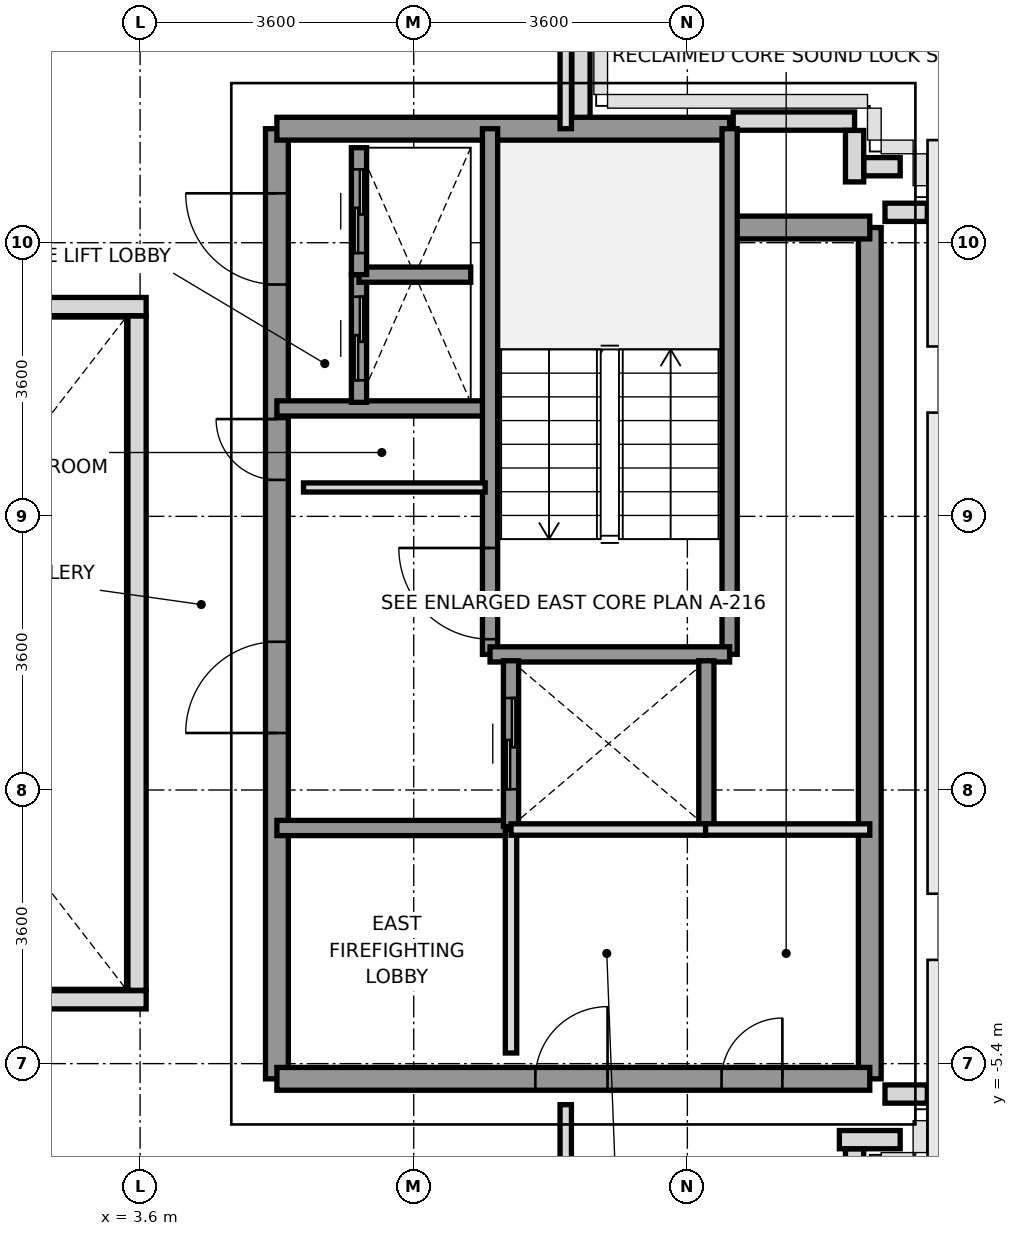
"""IFC4 building model, lengths in metres.
Left out: names, types, materials, properties, quantities, classifications, styles, units other than length and angle.
Written with IfcOpenShell. Run it as: python <this file> out.ifc"""

import sys

from ifc_helpers import new_model, si_unit, direction, frame, frame_2d, origin, place, context, subcontext, project, spatial, rectangle, extrude, source, transform, mapped, element, fill, save


model = new_model("IFC4")
c1 = context("Model", 3, precision=1e-05, world=origin(), true_north=direction((0.0, 1.0)))
c2 = subcontext(c1, "Body", "Model", "MODEL_VIEW")
j1 = project(units=[si_unit("LENGTHUNIT", "METRE"), si_unit("PLANEANGLEUNIT", "RADIAN")], contexts=[c1])
p1 = place(None, origin())
s1 = spatial("IfcSite", under=j1, at=p1, CompositionType="ELEMENT")
p2 = place(p1, origin())
s2 = spatial("IfcBuilding", under=s1, at=p2, CompositionType="ELEMENT")
p3 = place(p2, frame((0.0, 0.0, 262.0)))
s3 = spatial("IfcBuildingStorey", under=s2, at=p3, CompositionType="ELEMENT", Elevation=262.0)
p4 = place(p3, frame((13.957, -5.8, 0.0), z_axis=(0.0, 0.0, 1.0), x_axis=(-1.0, 0.0, 0.0)))
e1 = element("IfcWall", 1, at=p4, inside=s3, PredefinedType="PARAPET", context=c2, shape_type="SweptSolid", body=[
    extrude(rectangle(XDim=0.557, YDim=0.24, at=frame_2d((0.279, 0.0))), origin(), (0.0, 0.0, 1.0), 1.15),
])
p5 = place(p3, frame((13.6, -6.4, 0.0), z_axis=(0.0, 0.0, 1.0), x_axis=(-1.0, 0.0, 0.0)))
e2 = element("IfcWall", 2, at=p5, inside=s3, PredefinedType="PARAPET", context=c2, shape_type="SweptSolid", body=[
    extrude(rectangle(XDim=0.8, YDim=0.24, at=frame_2d((0.4, 0.0))), origin(), (0.0, 0.0, 1.0), 1.15),
])
p6 = place(p3, frame((13.0, -6.523, 0.0), z_axis=(0.0, 0.0, 1.0), x_axis=(0.0, -1.0, 0.0)))
e3 = element("IfcWall", 3, at=p6, inside=s3, PredefinedType="PARAPET", context=c2, shape_type="SweptSolid", body=[
    extrude(rectangle(XDim=0.477, YDim=0.24, at=frame_2d((0.239, 0.0))), origin(), (0.0, 0.0, 1.0), 1.15),
])
p7 = place(p3, frame((9.4, 8.622, 0.0), z_axis=(0.0, 0.0, 1.0), x_axis=(0.0, -1.0, 0.0)))
e4 = element("IfcWall", 4, at=p7, inside=s3, PredefinedType="PARAPET", context=c2, shape_type="SweptSolid", body=[
    extrude(rectangle(XDim=1.669, YDim=0.24, at=frame_2d((0.834, 0.0))), origin(), (0.0, 0.0, 1.0), 1.15),
])
p8 = place(p3, frame((11.403, 7.0, 0.0), z_axis=(0.0, 0.0, 1.0), x_axis=(1.0, 0.0, 0.0)))
e5 = element("IfcWall", 5, at=p8, inside=s3, PredefinedType="PARAPET", context=c2, shape_type="SweptSolid", body=[
    extrude(rectangle(XDim=1.597, YDim=0.24, at=frame_2d((0.798, 0.0))), origin(), (0.0, 0.0, 1.0), 1.15),
])
p9 = place(p3, frame((13.0, 6.877, 0.0), z_axis=(0.0, 0.0, 1.0), x_axis=(0.0, -1.0, 0.0)))
e6 = element("IfcWall", 6, at=p9, inside=s3, PredefinedType="PARAPET", context=c2, shape_type="SweptSolid", body=[
    extrude(rectangle(XDim=0.677, YDim=0.24, at=frame_2d((0.338, 0.0))), origin(), (0.0, 0.0, 1.0), 1.15),
])
p10 = place(p3, frame((13.123, 6.4, 0.0), z_axis=(0.0, 0.0, 1.0), x_axis=(1.0, 0.0, 0.0)))
e7 = element("IfcWall", 7, at=p10, inside=s3, PredefinedType="PARAPET", context=c2, shape_type="SweptSolid", body=[
    extrude(rectangle(XDim=0.477, YDim=0.24, at=frame_2d((0.239, 0.0))), origin(), (0.0, 0.0, 1.0), 1.15),
])
p11 = place(p3, frame((13.4, 5.8, 0.0), z_axis=(0.0, 0.0, 1.0), x_axis=(1.0, 0.0, 0.0)))
e8 = element("IfcWall", 8, at=p11, inside=s3, PredefinedType="PARAPET", context=c2, shape_type="SweptSolid", body=[
    extrude(rectangle(XDim=0.557, YDim=0.24, at=frame_2d((0.279, 0.0))), origin(), (0.0, 0.0, 1.0), 1.15),
])
p12 = place(p3, frame((13.2, -5.6, 0.0), z_axis=(0.0, 0.0, 1.0), x_axis=(0.0, 1.0, 0.0)))
e9 = element("IfcWall", 9, at=p12, inside=s3, PredefinedType="SHEAR", context=c2, shape_type="SweptSolid", body=[
    extrude(rectangle(XDim=11.2, YDim=0.3, at=frame_2d((5.6, 0.0))), origin(), (0.0, 0.0, 1.0), 3.01),
])
p13 = place(p3, frame((5.4, -5.6, 0.0), z_axis=(0.0, 0.0, 1.0), x_axis=(0.0, 1.0, 0.0)))
e10 = element("IfcWall", 10, at=p13, inside=s3, PredefinedType="SHEAR", context=c2, shape_type="SweptSolid", body=[
    extrude(rectangle(XDim=12.5, YDim=0.3, at=frame_2d((6.25, 0.0))), origin(), (0.0, 0.0, 1.0), 3.01),
])
p14 = place(p13, frame((4.55, 0.0, 0.0)))
e11 = element("IfcOpeningElement", 11, at=p14, cuts=e10, PredefinedType="OPENING", context=c2, shape_type="SweptSolid", body=[
    extrude(rectangle(XDim=1.2, YDim=2.2, at=frame_2d((0.6, 1.1))), frame((0.0, 0.16, 0.0), z_axis=(0.0, -1.0, 0.0), x_axis=(1.0, 0.0, 0.0)), (0.0, 0.0, 1.0), 0.32),
])
p15 = place(p13, frame((10.45, 0.0, 0.0)))
e12 = element("IfcOpeningElement", 12, at=p15, cuts=e10, PredefinedType="OPENING", context=c2, shape_type="SweptSolid", body=[
    extrude(rectangle(XDim=1.2, YDim=2.2, at=frame_2d((0.6, 1.1))), frame((0.0, 0.16, 0.0), z_axis=(0.0, -1.0, 0.0), x_axis=(1.0, 0.0, 0.0)), (0.0, 0.0, 1.0), 0.32),
])
p16 = place(p13, frame((7.88, 0.0, 0.0)))
e13 = element("IfcOpeningElement", 13, at=p16, cuts=e10, PredefinedType="OPENING", context=c2, shape_type="SweptSolid", body=[
    extrude(rectangle(XDim=0.8, YDim=2.1, at=frame_2d((0.4, 1.05))), frame((0.0, 0.16, 0.0), z_axis=(0.0, -1.0, 0.0), x_axis=(1.0, 0.0, 0.0)), (0.0, 0.0, 1.0), 0.32),
])
p17 = place(p3, frame((5.4, 6.9, 0.0), z_axis=(0.0, 0.0, 1.0), x_axis=(1.0, 0.0, 0.0)))
e14 = element("IfcWall", 14, at=p17, inside=s3, PredefinedType="SHEAR", context=c2, shape_type="SweptSolid", body=[
    extrude(rectangle(XDim=5.956, YDim=0.3, at=frame_2d((2.978, 0.0))), origin(), (0.0, 0.0, 1.0), 3.01),
])
p18 = place(p3, frame((11.356, 5.6, 0.0), z_axis=(0.0, 0.0, 1.0), x_axis=(1.0, 0.0, 0.0)))
e15 = element("IfcWall", 15, at=p18, inside=s3, PredefinedType="SHEAR", context=c2, shape_type="SweptSolid", body=[
    extrude(rectangle(XDim=1.844, YDim=0.3, at=frame_2d((0.922, 0.0))), origin(), (0.0, 0.0, 1.0), 3.01),
])
p19 = place(p3, frame((5.4, -5.6, 0.0), z_axis=(0.0, 0.0, 1.0), x_axis=(1.0, 0.0, 0.0)))
e16 = element("IfcWall", 16, at=p19, inside=s3, PredefinedType="SHEAR", context=c2, shape_type="SweptSolid", body=[
    extrude(rectangle(XDim=7.8, YDim=0.3, at=frame_2d((3.9, 0.0))), origin(), (0.0, 0.0, 1.0), 3.01),
])
p20 = place(p19, frame((5.85, 0.0, 0.0)))
e17 = element("IfcOpeningElement", 17, at=p20, cuts=e16, PredefinedType="OPENING", context=c2, shape_type="SweptSolid", body=[
    extrude(rectangle(XDim=0.8, YDim=2.1, at=frame_2d((0.4, 1.05))), frame((0.0, 0.16, 0.0), z_axis=(0.0, -1.0, 0.0), x_axis=(1.0, 0.0, 0.0)), (0.0, 0.0, 1.0), 0.32),
])
p21 = place(p19, frame((3.4, 0.0, 0.0)))
e18 = element("IfcOpeningElement", 18, at=p21, cuts=e16, PredefinedType="OPENING", context=c2, shape_type="SweptSolid", body=[
    extrude(rectangle(XDim=0.95, YDim=2.15, at=frame_2d((0.475, 1.075))), frame((0.0, 0.16, 0.0), z_axis=(0.0, -1.0, 0.0), x_axis=(1.0, 0.0, 0.0)), (0.0, 0.0, 1.0), 0.32),
])
p22 = place(p3, frame((5.4, 3.22, 0.0), z_axis=(0.0, 0.0, 1.0), x_axis=(1.0, 0.0, 0.0)))
e19 = element("IfcWall", 19, at=p22, inside=s3, PredefinedType="SOLIDWALL", context=c2, shape_type="SweptSolid", body=[
    extrude(rectangle(XDim=2.78, YDim=0.2, at=frame_2d((1.39, 0.0))), origin(), (0.0, 0.0, 1.0), 3.01),
])
p23 = place(p3, frame((5.4, -2.3, 0.0), z_axis=(0.0, 0.0, 1.0), x_axis=(1.0, 0.0, 0.0)))
e20 = element("IfcWall", 20, at=p23, inside=s3, PredefinedType="SOLIDWALL", context=c2, shape_type="SweptSolid", body=[
    extrude(rectangle(XDim=3.08, YDim=0.2, at=frame_2d((1.54, 0.0))), origin(), (0.0, 0.0, 1.0), 3.01),
])
p24 = place(p3, frame((8.204, -0.016, 0.0), z_axis=(0.0, 0.0, 1.0), x_axis=(0.0, 1.0, 0.0)))
e21 = element("IfcWall", 21, at=p24, inside=s3, PredefinedType="SOLIDWALL", context=c2, shape_type="SweptSolid", body=[
    extrude(rectangle(XDim=6.916, YDim=0.2, at=frame_2d((3.458, 0.0))), origin(), (0.0, 0.0, 1.0), 3.01),
])
p25 = place(p24, frame((0.2, 0.0, 0.0)))
e22 = element("IfcOpeningElement", 22, at=p25, cuts=e21, PredefinedType="OPENING", context=c2, shape_type="SweptSolid", body=[
    extrude(rectangle(XDim=1.2, YDim=2.2, at=frame_2d((0.6, 1.1))), frame((0.0, 0.11, 0.0), z_axis=(0.0, -1.0, 0.0), x_axis=(1.0, 0.0, 0.0)), (0.0, 0.0, 1.0), 0.22),
])
p26 = place(p3, frame((11.356, -0.016, 0.0), z_axis=(0.0, 0.0, 1.0), x_axis=(0.0, 1.0, 0.0)))
e23 = element("IfcWall", 23, at=p26, inside=s3, PredefinedType="SOLIDWALL", context=c2, shape_type="SweptSolid", body=[
    extrude(rectangle(XDim=6.916, YDim=0.2, at=frame_2d((3.458, 0.0))), origin(), (0.0, 0.0, 1.0), 3.01),
])
p27 = place(p3, frame((8.204, -0.016, 0.0), z_axis=(0.0, 0.0, 1.0), x_axis=(1.0, 0.0, 0.0)))
e24 = element("IfcWall", 24, at=p27, inside=s3, PredefinedType="SOLIDWALL", context=c2, shape_type="SweptSolid", body=[
    extrude(rectangle(XDim=3.152, YDim=0.2, at=frame_2d((1.576, 0.0))), origin(), (0.0, 0.0, 1.0), 3.01),
])
p28 = place(p3, frame((8.48, -2.28, 0.0), z_axis=(0.0, 0.0, 1.0), x_axis=(0.0, 1.0, 0.0)))
e25 = element("IfcWall", 25, at=p28, inside=s3, PredefinedType="SOLIDWALL", context=c2, shape_type="SweptSolid", body=[
    extrude(rectangle(XDim=2.18, YDim=0.2, at=frame_2d((1.09, 0.0))), origin(), (0.0, 0.0, 1.0), 3.01),
])
p29 = place(p28, frame((0.49, 0.0, 0.0)))
e26 = element("IfcOpeningElement", 26, at=p29, cuts=e25, PredefinedType="OPENING", context=c2, shape_type="SweptSolid", body=[
    extrude(rectangle(XDim=1.2, YDim=2.2, at=frame_2d((0.6, 1.1))), frame((0.0, 0.11, 0.0), z_axis=(0.0, -1.0, 0.0), x_axis=(1.0, 0.0, 0.0)), (0.0, 0.0, 1.0), 0.22),
])
p30 = place(p3, frame((11.05, -2.28, 0.0), z_axis=(0.0, 0.0, 1.0), x_axis=(0.0, 1.0, 0.0)))
e27 = element("IfcWall", 27, at=p30, inside=s3, PredefinedType="SOLIDWALL", context=c2, shape_type="SweptSolid", body=[
    extrude(rectangle(XDim=2.18, YDim=0.2, at=frame_2d((1.09, 0.0))), origin(), (0.0, 0.0, 1.0), 3.01),
])
p31 = place(p3, frame((6.48, 3.3, 0.0), z_axis=(0.0, 0.0, 1.0), x_axis=(0.0, 1.0, 0.0)))
e28 = element("IfcWall", 28, at=p31, inside=s3, PredefinedType="SOLIDWALL", context=c2, shape_type="SweptSolid", body=[
    extrude(rectangle(XDim=1.68, YDim=0.2, at=frame_2d((0.84, 0.0))), origin(), (0.0, 0.0, 1.0), 3.01),
])
p32 = place(p31, frame((0.29, 0.0, 0.0)))
e29 = element("IfcOpeningElement", 29, at=p32, cuts=e28, PredefinedType="OPENING", context=c2, shape_type="SweptSolid", body=[
    extrude(rectangle(XDim=1.1, YDim=2.2, at=frame_2d((0.55, 1.1))), frame((0.0, 0.11, 0.0), z_axis=(0.0, -1.0, 0.0), x_axis=(1.0, 0.0, 0.0)), (0.0, 0.0, 1.0), 0.22),
])
p33 = place(p3, frame((6.48, 4.98, 0.0), z_axis=(0.0, 0.0, 1.0), x_axis=(1.0, 0.0, 0.0)))
e30 = element("IfcWall", 30, at=p33, inside=s3, PredefinedType="SOLIDWALL", context=c2, shape_type="SweptSolid", body=[
    extrude(rectangle(XDim=1.47, YDim=0.2, at=frame_2d((0.735, 0.0))), origin(), (0.0, 0.0, 1.0), 3.01),
])
p34 = place(p3, frame((6.48, 4.98, 0.0), z_axis=(0.0, 0.0, 1.0), x_axis=(0.0, 1.0, 0.0)))
e31 = element("IfcWall", 31, at=p34, inside=s3, PredefinedType="SOLIDWALL", context=c2, shape_type="SweptSolid", body=[
    extrude(rectangle(XDim=1.67, YDim=0.2, at=frame_2d((0.835, 0.0))), origin(), (0.0, 0.0, 1.0), 3.01),
])
p35 = place(p34, frame((0.285, 0.0, 0.0)))
e32 = element("IfcOpeningElement", 32, at=p35, cuts=e31, PredefinedType="OPENING", context=c2, shape_type="SweptSolid", body=[
    extrude(rectangle(XDim=1.1, YDim=2.2, at=frame_2d((0.55, 1.1))), frame((0.0, 0.11, 0.0), z_axis=(0.0, -1.0, 0.0), x_axis=(1.0, 0.0, 0.0)), (0.0, 0.0, 1.0), 0.22),
])
p36 = place(p3, frame((5.75, 2.18, 0.0), z_axis=(0.0, 0.0, 1.0), x_axis=(1.0, 0.0, 0.0)))
e33 = element("IfcWall", 33, at=p36, inside=s3, PredefinedType="PARTITIONING", context=c2, shape_type="SweptSolid", body=[
    extrude(rectangle(XDim=2.39, YDim=0.12, at=frame_2d((1.195, 0.0))), origin(), (0.0, 0.0, 1.0), 3.01),
])
p37 = place(p3, frame((11.02, -2.32, 0.0), z_axis=(0.0, 0.0, 1.0), x_axis=(1.0, 0.0, 0.0)))
e34 = element("IfcWall", 34, at=p37, inside=s3, PredefinedType="PARTITIONING", context=c2, shape_type="SweptSolid", body=[
    extrude(rectangle(XDim=2.18, YDim=0.15, at=frame_2d((1.09, 0.0))), origin(), (0.0, 0.0, 1.0), 3.01),
])
p38 = place(p3, frame((8.48, -5.26, 0.0), z_axis=(0.0, 0.0, 1.0), x_axis=(0.0, 1.0, 0.0)))
e35 = element("IfcWall", 35, at=p38, inside=s3, PredefinedType="PARTITIONING", context=c2, shape_type="SweptSolid", body=[
    extrude(rectangle(XDim=2.94, YDim=0.15, at=frame_2d((1.47, 0.0))), origin(), (0.0, 0.0, 1.0), 3.01),
])
p39 = place(p3, frame((8.48, -2.32, 0.0), z_axis=(0.0, 0.0, 1.0), x_axis=(1.0, 0.0, 0.0)))
e36 = element("IfcWall", 36, at=p39, inside=s3, PredefinedType="PARTITIONING", context=c2, shape_type="SweptSolid", body=[
    extrude(rectangle(XDim=2.56, YDim=0.15, at=frame_2d((1.28, 0.0))), origin(), (0.0, 0.0, 1.0), 3.01),
])
p40 = place(p3, frame((9.2, 6.9, 0.0), z_axis=(0.0, 0.0, 1.0), x_axis=(0.0, 1.0, 0.0)))
e37 = element("IfcWall", 37, at=p40, inside=s3, PredefinedType="PARTITIONING", context=c2, shape_type="SweptSolid", body=[
    extrude(rectangle(XDim=3.38, YDim=0.15, at=frame_2d((1.69, 0.0))), origin(), (0.0, 0.0, 1.0), 2.61),
])
p41 = place(p3, frame((9.2, -10.28, 0.0), z_axis=(0.0, 0.0, 1.0), x_axis=(0.0, 1.0, 0.0)))
e38 = element("IfcWall", 38, at=p41, inside=s3, PredefinedType="PARTITIONING", context=c2, shape_type="SweptSolid", body=[
    extrude(rectangle(XDim=4.34, YDim=0.15, at=frame_2d((2.17, 0.0))), origin(), (0.0, 0.0, 1.0), 2.61),
])
for number, where, z_axis, x_axis in (
    (39, (-3.68, -4.56, 0.0), (0.0, 0.0, 1.0), (1.0, 0.0, 0.0)),
    (40, (-3.68, 4.56, 0.0), (0.0, 0.0, 1.0), (1.0, 0.0, 0.0)),
):
    element("IfcWall", number, at=place(p3, frame(where, z_axis=z_axis, x_axis=x_axis)), inside=s3, PredefinedType="PARAPET", context=c2, shape_type="SweptSolid", body=[
        extrude(rectangle(XDim=7.36, YDim=0.24, at=frame_2d((3.68, 0.0))), origin(), (0.0, 0.0, 1.0), 1.15),
    ])
p42 = place(p3, frame((3.56, -4.435, 0.0), z_axis=(0.0, 0.0, 1.0), x_axis=(0.0, 1.0, 0.0)))
e41 = element("IfcWall", 41, at=p42, inside=s3, PredefinedType="PARAPET", context=c2, shape_type="SweptSolid", body=[
    extrude(rectangle(XDim=8.87, YDim=0.24, at=frame_2d((4.435, 0.0))), origin(), (0.0, 0.0, 1.0), 1.15),
])
m1 = source(origin(), c2, "Body", "SweptSolid", [
    extrude(rectangle(XDim=1.2, YDim=2.2, at=frame_2d((0.6, 1.1))), frame((0.0, 0.025, 0.0), z_axis=(0.0, -1.0, 0.0), x_axis=(1.0, 0.0, 0.0)), (0.0, 0.0, 1.0), 0.05),
])
p43 = place(p25, origin())
e42 = element("IfcDoor", 42, at=p43, inside=s3, OperationType="SINGLE_SWING_RIGHT", PredefinedType="DOOR", context=c2, shape_type="MappedRepresentation", body=[
    mapped(m1, transform((0.0, 0.0, 0.0), x_axis=(1.0, 0.0, 0.0), y_axis=(0.0, 1.0, 0.0), z_axis=(0.0, 0.0, 1.0), scale=1.0)),
])
fill(e22, e42)
p44 = place(p14, origin())
e43 = element("IfcDoor", 43, at=p44, inside=s3, OperationType="SINGLE_SWING_LEFT", PredefinedType="DOOR", context=c2, shape_type="MappedRepresentation", body=[
    mapped(m1, transform((0.0, 0.0, 0.0), x_axis=(1.0, 0.0, 0.0), y_axis=(0.0, 1.0, 0.0), z_axis=(0.0, 0.0, 1.0), scale=1.0)),
])
fill(e11, e43)
p45 = place(p15, origin())
e44 = element("IfcDoor", 44, at=p45, inside=s3, OperationType="SINGLE_SWING_RIGHT", PredefinedType="DOOR", context=c2, shape_type="MappedRepresentation", body=[
    mapped(m1, transform((0.0, 0.0, 0.0), x_axis=(1.0, 0.0, 0.0), y_axis=(0.0, 1.0, 0.0), z_axis=(0.0, 0.0, 1.0), scale=1.0)),
])
fill(e12, e44)
m2 = source(origin(), c2, "Body", "SweptSolid", [
    extrude(rectangle(XDim=0.8, YDim=2.1, at=frame_2d((0.4, 1.05))), frame((0.0, 0.025, 0.0), z_axis=(0.0, -1.0, 0.0), x_axis=(1.0, 0.0, 0.0)), (0.0, 0.0, 1.0), 0.05),
])
p46 = place(p16, origin())
e45 = element("IfcDoor", 45, at=p46, inside=s3, OperationType="SINGLE_SWING_RIGHT", PredefinedType="DOOR", context=c2, shape_type="MappedRepresentation", body=[
    mapped(m2, transform((0.0, 0.0, 0.0), x_axis=(1.0, 0.0, 0.0), y_axis=(0.0, 1.0, 0.0), z_axis=(0.0, 0.0, 1.0), scale=1.0)),
])
fill(e13, e45)
p47 = place(p20, origin())
e46 = element("IfcDoor", 46, at=p47, inside=s3, OperationType="SINGLE_SWING_RIGHT", PredefinedType="DOOR", context=c2, shape_type="MappedRepresentation", body=[
    mapped(m2, transform((0.0, 0.0, 0.0), x_axis=(1.0, 0.0, 0.0), y_axis=(0.0, 1.0, 0.0), z_axis=(0.0, 0.0, 1.0), scale=1.0)),
])
fill(e17, e46)
m3 = source(origin(), c2, "Body", "SweptSolid", [
    extrude(rectangle(XDim=0.95, YDim=2.15, at=frame_2d((0.475, 1.075))), frame((0.0, 0.025, 0.0), z_axis=(0.0, -1.0, 0.0), x_axis=(1.0, 0.0, 0.0)), (0.0, 0.0, 1.0), 0.05),
])
p48 = place(p21, origin())
e47 = element("IfcDoor", 47, at=p48, inside=s3, OperationType="SINGLE_SWING_RIGHT", PredefinedType="DOOR", context=c2, shape_type="MappedRepresentation", body=[
    mapped(m3, transform((0.0, 0.0, 0.0), x_axis=(1.0, 0.0, 0.0), y_axis=(0.0, 1.0, 0.0), z_axis=(0.0, 0.0, 1.0), scale=1.0)),
])
fill(e18, e47)
p49 = place(p29, origin())
e48 = element("IfcDoor", 48, at=p49, inside=s3, OperationType="SLIDING_TO_RIGHT", PredefinedType="DOOR", context=c2, shape_type="MappedRepresentation", body=[
    mapped(m1, transform((0.0, 0.0, 0.0), x_axis=(1.0, 0.0, 0.0), y_axis=(0.0, 1.0, 0.0), z_axis=(0.0, 0.0, 1.0), scale=1.0)),
])
fill(e26, e48)
m4 = source(origin(), c2, "Body", "SweptSolid", [
    extrude(rectangle(XDim=1.1, YDim=2.2, at=frame_2d((0.55, 1.1))), frame((0.0, 0.025, 0.0), z_axis=(0.0, -1.0, 0.0), x_axis=(1.0, 0.0, 0.0)), (0.0, 0.0, 1.0), 0.05),
])
p50 = place(p32, origin())
e49 = element("IfcDoor", 49, at=p50, inside=s3, OperationType="SLIDING_TO_LEFT", PredefinedType="DOOR", context=c2, shape_type="MappedRepresentation", body=[
    mapped(m4, transform((0.0, 0.0, 0.0), x_axis=(1.0, 0.0, 0.0), y_axis=(0.0, 1.0, 0.0), z_axis=(0.0, 0.0, 1.0), scale=1.0)),
])
fill(e29, e49)
p51 = place(p35, origin())
e50 = element("IfcDoor", 50, at=p51, inside=s3, OperationType="SLIDING_TO_LEFT", PredefinedType="DOOR", context=c2, shape_type="MappedRepresentation", body=[
    mapped(m4, transform((0.0, 0.0, 0.0), x_axis=(1.0, 0.0, 0.0), y_axis=(0.0, 1.0, 0.0), z_axis=(0.0, 0.0, 1.0), scale=1.0)),
])
fill(e32, e50)
save(model, sys.argv[1])
